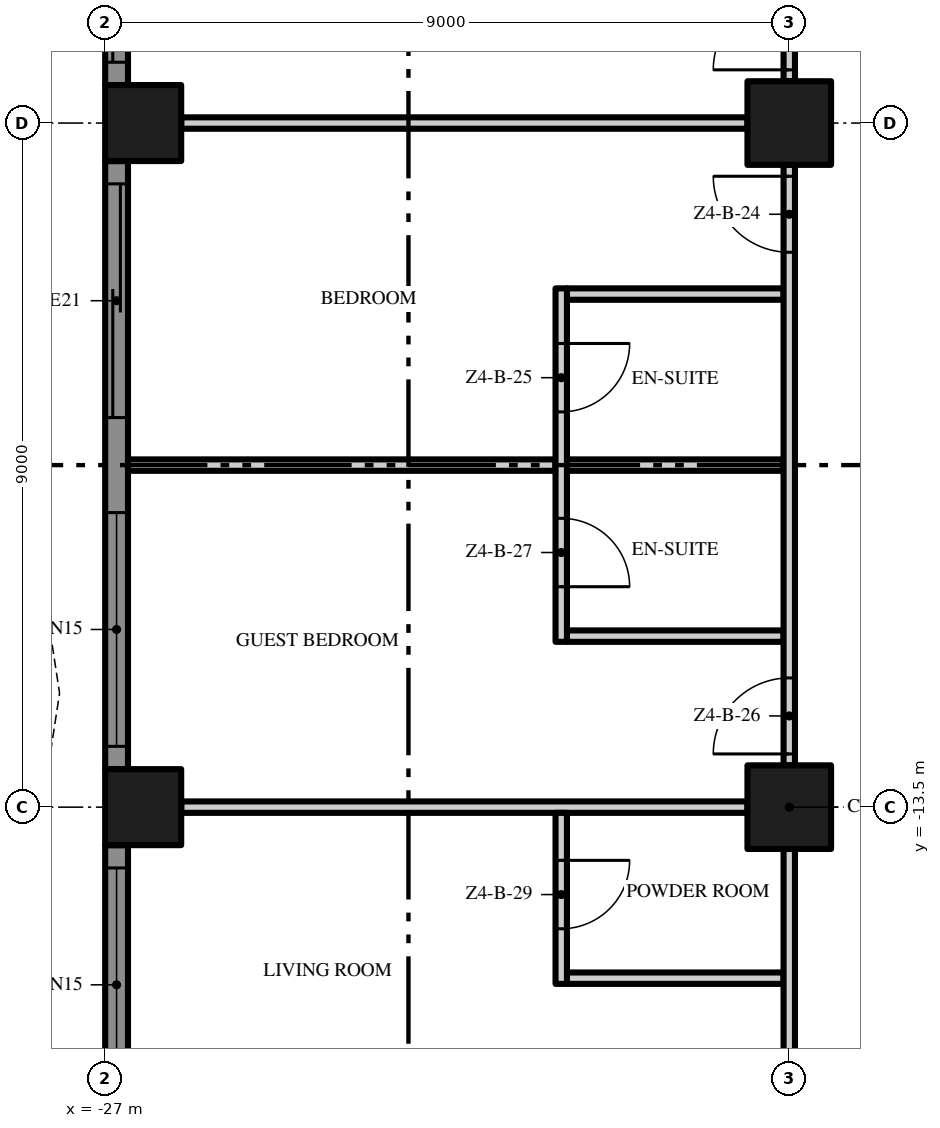
"""IFC4 building model, lengths in metres.
Left out: names, types, materials, properties, quantities, classifications, styles, units other than length and angle.
Written with IfcOpenShell. Run it as: python <this file> out.ifc"""

import sys

from ifc_helpers import new_model, si_unit, direction, frame, frame_2d, origin, origin_2d, place, context, subcontext, project, spatial, polyline, rectangle, outline, extrude, element, fill, save


model = new_model("IFC4")
c1 = context("Model", 3, precision=1e-05, world=origin(), true_north=direction((0.0, 1.0)))
c2 = subcontext(c1, "Body", "Model", "MODEL_VIEW")
j1 = project(units=[si_unit("LENGTHUNIT", "METRE"), si_unit("PLANEANGLEUNIT", "RADIAN")], contexts=[c1])
p1 = place(None, origin())
s1 = spatial("IfcSite", under=j1, at=p1, CompositionType="ELEMENT")
p2 = place(p1, origin())
s2 = spatial("IfcBuilding", under=s1, at=p2, CompositionType="ELEMENT")
p3 = place(p2, frame((0.0, 0.0, 203.4)))
s3 = spatial("IfcBuildingStorey", under=s2, at=p3, CompositionType="ELEMENT", Elevation=203.4)
for number, where, z_axis, x_axis in (
    (1, (-18.0, -13.5, 0.0), (0.0, 0.0, 1.0), (1.0, 0.0, 0.0)),
    (2, (-18.0, -4.5, 0.0), (0.0, 0.0, 1.0), (1.0, 0.0, 0.0)),
):
    element("IfcColumn", number, at=place(p3, frame(where, z_axis=z_axis, x_axis=x_axis)), inside=s3, PredefinedType="COLUMN", context=c2, shape_type="SweptSolid", body=[
        extrude(rectangle(XDim=1.1, YDim=1.1, at=origin_2d()), origin(), (0.0, 0.0, 1.0), 3.5),
    ])
for number, where, z_axis, x_axis in (
    (3, (-26.5, -13.5, 0.0), (0.0, 0.0, 1.0), (1.0, 0.0, 0.0)),
    (4, (-26.5, -4.5, 0.0), (0.0, 0.0, 1.0), (1.0, 0.0, 0.0)),
):
    element("IfcColumn", number, at=place(p3, frame(where, z_axis=z_axis, x_axis=x_axis)), inside=s3, PredefinedType="COLUMN", context=c2, shape_type="SweptSolid", body=[
        extrude(rectangle(XDim=1.0, YDim=1.0, at=origin_2d()), origin(), (0.0, 0.0, 1.0), 3.5),
    ])
p4 = place(p3, frame((-26.85, -4.0, 0.0), z_axis=(0.0, 0.0, 1.0), x_axis=(0.0, 1.0, 0.0)))
e5 = element("IfcWall", 5, at=p4, inside=s3, PredefinedType="SOLIDWALL", context=c2, shape_type="SweptSolid", body=[
    extrude(rectangle(XDim=8.0, YDim=0.3, at=frame_2d((4.0, 0.0))), origin(), (0.0, 0.0, 1.0), 3.5),
])
p5 = place(p4, frame((4.625, 0.0, 0.45)))
e6 = element("IfcOpeningElement", 6, at=p5, cuts=e5, PredefinedType="OPENING", context=c2, shape_type="SweptSolid", body=[
    extrude(rectangle(XDim=3.075, YDim=2.65, at=frame_2d((1.538, 1.325))), frame((0.0, 0.16, 0.0), z_axis=(0.0, -1.0, 0.0), x_axis=(1.0, 0.0, 0.0)), (0.0, 0.0, 1.0), 0.32),
])
p6 = place(p4, frame((0.3, 0.0, 0.0)))
e7 = element("IfcOpeningElement", 7, at=p6, cuts=e5, PredefinedType="OPENING", context=c2, shape_type="SweptSolid", body=[
    extrude(rectangle(XDim=3.075, YDim=2.4, at=frame_2d((1.538, 1.2))), frame((0.0, 0.16, 0.0), z_axis=(0.0, -1.0, 0.0), x_axis=(1.0, 0.0, 0.0)), (0.0, 0.0, 1.0), 0.32),
])
p7 = place(p3, frame((-26.85, -13.0, 0.0), z_axis=(0.0, 0.0, 1.0), x_axis=(0.0, 1.0, 0.0)))
e8 = element("IfcWall", 8, at=p7, inside=s3, PredefinedType="SOLIDWALL", context=c2, shape_type="SweptSolid", body=[
    extrude(rectangle(XDim=8.0, YDim=0.3, at=frame_2d((4.0, 0.0))), origin(), (0.0, 0.0, 1.0), 3.5),
])
p8 = place(p7, frame((4.625, 0.0, 0.0)))
e9 = element("IfcOpeningElement", 9, at=p8, cuts=e8, PredefinedType="OPENING", context=c2, shape_type="SweptSolid", body=[
    extrude(rectangle(XDim=3.075, YDim=2.4, at=frame_2d((1.538, 1.2))), frame((0.0, 0.16, 0.0), z_axis=(0.0, -1.0, 0.0), x_axis=(1.0, 0.0, 0.0)), (0.0, 0.0, 1.0), 0.32),
])
p9 = place(p7, frame((0.3, 0.0, 0.45)))
e10 = element("IfcOpeningElement", 10, at=p9, cuts=e8, PredefinedType="OPENING", context=c2, shape_type="SweptSolid", body=[
    extrude(rectangle(XDim=3.075, YDim=2.65, at=frame_2d((1.538, 1.325))), frame((0.0, 0.16, 0.0), z_axis=(0.0, -1.0, 0.0), x_axis=(1.0, 0.0, 0.0)), (0.0, 0.0, 1.0), 0.32),
])
p10 = place(p3, frame((-26.85, -18.0, 0.0), z_axis=(0.0, 0.0, 1.0), x_axis=(0.0, 1.0, 0.0)))
e11 = element("IfcWall", 11, at=p10, inside=s3, PredefinedType="SOLIDWALL", context=c2, shape_type="SweptSolid", body=[
    extrude(rectangle(XDim=4.0, YDim=0.3, at=frame_2d((2.0, 0.0))), origin(), (0.0, 0.0, 1.0), 3.5),
])
p11 = place(p10, frame((0.625, 0.0, 0.45)))
e12 = element("IfcOpeningElement", 12, at=p11, cuts=e11, PredefinedType="OPENING", context=c2, shape_type="SweptSolid", body=[
    extrude(rectangle(XDim=3.075, YDim=2.65, at=frame_2d((1.538, 1.325))), frame((0.0, 0.16, 0.0), z_axis=(0.0, -1.0, 0.0), x_axis=(1.0, 0.0, 0.0)), (0.0, 0.0, 1.0), 0.32),
])
p12 = place(p3, origin())
e13 = element("IfcWall", 13, at=p12, inside=s3, PredefinedType="USERDEFINED", context=c2, shape_type="SweptSolid", body=[
    extrude(outline(polyline([(-27.6, 18.0), (-27.829, 16.5), (-28.429, 15.0), (-29.171, 13.5), (-29.771, 12.0), (-30.0, 10.5), (-29.771, 9.0), (-29.171, 7.5), (-28.429, 6.0), (-27.829, 4.5), (-27.6, 3.0), (-27.829, 1.5), (-28.429, 0.0), (-29.171, -1.5), (-29.771, -3.0), (-30.0, -4.5), (-29.771, -6.0), (-29.171, -7.5), (-28.429, -9.0), (-27.829, -10.5), (-27.6, -12.0), (-27.829, -13.5), (-28.429, -15.0), (-29.171, -16.5), (-29.771, -18.0), (-29.539, -18.093), (-28.942, -16.602), (-28.201, -15.102), (-27.586, -13.566), (-27.347, -12.0), (-27.586, -10.434), (-28.201, -8.898), (-28.942, -7.398), (-29.528, -5.934), (-29.747, -4.5), (-29.528, -3.066), (-28.942, -1.602), (-28.201, -0.102), (-27.586, 1.434), (-27.347, 3.0), (-27.586, 4.566), (-28.201, 6.102), (-28.942, 7.602), (-29.528, 9.066), (-29.747, 10.5), (-29.528, 11.934), (-28.942, 13.398), (-28.201, 14.898), (-27.586, 16.434), (-27.353, 17.962), (-27.6, 18.0)])), origin(), (0.0, 0.0, 1.0), 0.9),
])
p13 = place(p3, frame((-20.925, -15.75, 0.0), z_axis=(0.0, 0.0, 1.0), x_axis=(1.0, 0.0, 0.0)))
e14 = element("IfcWall", 14, at=p13, inside=s3, PredefinedType="PARTITIONING", context=c2, shape_type="SweptSolid", body=[
    extrude(rectangle(XDim=2.85, YDim=0.15, at=frame_2d((1.425, 0.0))), origin(), (0.0, 0.0, 1.0), 3.5),
])
p14 = place(p3, frame((-26.0, -13.5, 0.0), z_axis=(0.0, 0.0, 1.0), x_axis=(1.0, 0.0, 0.0)))
e15 = element("IfcWall", 15, at=p14, inside=s3, PredefinedType="PARTITIONING", context=c2, shape_type="SweptSolid", body=[
    extrude(rectangle(XDim=7.45, YDim=0.15, at=frame_2d((3.725, 0.0))), origin(), (0.0, 0.0, 1.0), 3.5),
])
p15 = place(p3, frame((-20.925, -11.25, 0.0), z_axis=(0.0, 0.0, 1.0), x_axis=(1.0, 0.0, 0.0)))
e16 = element("IfcWall", 16, at=p15, inside=s3, PredefinedType="PARTITIONING", context=c2, shape_type="SweptSolid", body=[
    extrude(rectangle(XDim=2.85, YDim=0.15, at=frame_2d((1.425, 0.0))), origin(), (0.0, 0.0, 1.0), 3.5),
])
p16 = place(p3, frame((-26.7, -9.0, 0.0), z_axis=(0.0, 0.0, 1.0), x_axis=(1.0, 0.0, 0.0)))
e17 = element("IfcWall", 17, at=p16, inside=s3, PredefinedType="PARTITIONING", context=c2, shape_type="SweptSolid", body=[
    extrude(rectangle(XDim=5.625, YDim=0.15, at=frame_2d((2.812, 0.0))), origin(), (0.0, 0.0, 1.0), 3.5),
])
for number, where, z_axis, x_axis in (
    (18, (-20.925, -9.0, 0.0), (0.0, 0.0, 1.0), (1.0, 0.0, 0.0)),
    (19, (-20.925, -6.75, 0.0), (0.0, 0.0, 1.0), (1.0, 0.0, 0.0)),
):
    element("IfcWall", number, at=place(p3, frame(where, z_axis=z_axis, x_axis=x_axis)), inside=s3, PredefinedType="PARTITIONING", context=c2, shape_type="SweptSolid", body=[
        extrude(rectangle(XDim=2.85, YDim=0.15, at=frame_2d((1.425, 0.0))), origin(), (0.0, 0.0, 1.0), 3.5),
    ])
p17 = place(p3, frame((-26.0, -4.5, 0.0), z_axis=(0.0, 0.0, 1.0), x_axis=(1.0, 0.0, 0.0)))
e20 = element("IfcWall", 20, at=p17, inside=s3, PredefinedType="PARTITIONING", context=c2, shape_type="SweptSolid", body=[
    extrude(rectangle(XDim=7.45, YDim=0.15, at=frame_2d((3.725, 0.0))), origin(), (0.0, 0.0, 1.0), 3.5),
])
p18 = place(p3, frame((-21.0, -13.575, 0.0), z_axis=(0.0, 0.0, 1.0), x_axis=(0.0, -1.0, 0.0)))
e21 = element("IfcWall", 21, at=p18, inside=s3, PredefinedType="PARTITIONING", context=c2, shape_type="SweptSolid", body=[
    extrude(rectangle(XDim=2.25, YDim=0.15, at=frame_2d((1.125, 0.0))), origin(), (0.0, 0.0, 1.0), 3.5),
])
p19 = place(p18, frame((0.625, 0.0, 0.0)))
e22 = element("IfcOpeningElement", 22, at=p19, cuts=e21, PredefinedType="OPENING", context=c2, shape_type="SweptSolid", body=[
    extrude(rectangle(XDim=0.9, YDim=2.1, at=frame_2d((0.45, 1.05))), frame((0.0, 0.085, 0.0), z_axis=(0.0, -1.0, 0.0), x_axis=(1.0, 0.0, 0.0)), (0.0, 0.0, 1.0), 0.17),
])
p20 = place(p3, frame((-21.0, -6.675, 0.0), z_axis=(0.0, 0.0, 1.0), x_axis=(0.0, -1.0, 0.0)))
e23 = element("IfcWall", 23, at=p20, inside=s3, PredefinedType="PARTITIONING", context=c2, shape_type="SweptSolid", body=[
    extrude(rectangle(XDim=4.65, YDim=0.15, at=frame_2d((2.325, 0.0))), origin(), (0.0, 0.0, 1.0), 3.5),
])
p21 = place(p20, frame((0.725, 0.0, 0.0)))
e24 = element("IfcOpeningElement", 24, at=p21, cuts=e23, PredefinedType="OPENING", context=c2, shape_type="SweptSolid", body=[
    extrude(rectangle(XDim=0.9, YDim=2.1, at=frame_2d((0.45, 1.05))), frame((0.0, 0.085, 0.0), z_axis=(0.0, -1.0, 0.0), x_axis=(1.0, 0.0, 0.0)), (0.0, 0.0, 1.0), 0.17),
])
p22 = place(p20, frame((3.025, 0.0, 0.0)))
e25 = element("IfcOpeningElement", 25, at=p22, cuts=e23, PredefinedType="OPENING", context=c2, shape_type="SweptSolid", body=[
    extrude(rectangle(XDim=0.9, YDim=2.1, at=frame_2d((0.45, 1.05))), frame((0.0, 0.085, 0.0), z_axis=(0.0, -1.0, 0.0), x_axis=(1.0, 0.0, 0.0)), (0.0, 0.0, 1.0), 0.17),
])
p23 = place(p3, frame((-18.0, -21.5, 0.0), z_axis=(0.0, 0.0, 1.0), x_axis=(0.0, 1.0, 0.0)))
e26 = element("IfcWall", 26, at=p23, inside=s3, PredefinedType="PARTITIONING", context=c2, shape_type="SweptSolid", body=[
    extrude(rectangle(XDim=7.45, YDim=0.15, at=frame_2d((3.725, 0.0))), origin(), (0.0, 0.0, 1.0), 3.5),
])
p24 = place(p23, frame((1.45, 0.0, 0.0)))
e27 = element("IfcOpeningElement", 27, at=p24, cuts=e26, PredefinedType="OPENING", context=c2, shape_type="SweptSolid", body=[
    extrude(rectangle(XDim=1.8, YDim=2.4, at=frame_2d((0.9, 1.2))), frame((0.0, 0.085, 0.0), z_axis=(0.0, -1.0, 0.0), x_axis=(1.0, 0.0, 0.0)), (0.0, 0.0, 1.0), 0.17),
])
p25 = place(p3, frame((-18.0, -12.95, 0.0), z_axis=(0.0, 0.0, 1.0), x_axis=(0.0, 1.0, 0.0)))
e28 = element("IfcWall", 28, at=p25, inside=s3, PredefinedType="PARTITIONING", context=c2, shape_type="SweptSolid", body=[
    extrude(rectangle(XDim=7.9, YDim=0.15, at=frame_2d((3.95, 0.0))), origin(), (0.0, 0.0, 1.0), 3.5),
])
p26 = place(p25, frame((6.75, 0.0, 0.0)))
e29 = element("IfcOpeningElement", 29, at=p26, cuts=e28, PredefinedType="OPENING", context=c2, shape_type="SweptSolid", body=[
    extrude(rectangle(XDim=1.0, YDim=2.4, at=frame_2d((0.5, 1.2))), frame((0.0, 0.085, 0.0), z_axis=(0.0, -1.0, 0.0), x_axis=(1.0, 0.0, 0.0)), (0.0, 0.0, 1.0), 0.17),
])
p27 = place(p25, frame((0.15, 0.0, 0.0)))
e30 = element("IfcOpeningElement", 30, at=p27, cuts=e28, PredefinedType="OPENING", context=c2, shape_type="SweptSolid", body=[
    extrude(rectangle(XDim=1.0, YDim=2.4, at=frame_2d((0.5, 1.2))), frame((0.0, 0.085, 0.0), z_axis=(0.0, -1.0, 0.0), x_axis=(1.0, 0.0, 0.0)), (0.0, 0.0, 1.0), 0.17),
])
p28 = place(p3, frame((-18.0, -3.95, 0.0), z_axis=(0.0, 0.0, 1.0), x_axis=(0.0, 1.0, 0.0)))
e31 = element("IfcWall", 31, at=p28, inside=s3, PredefinedType="PARTITIONING", context=c2, shape_type="SweptSolid", body=[
    extrude(rectangle(XDim=3.85, YDim=0.15, at=frame_2d((1.925, 0.0))), origin(), (0.0, 0.0, 1.0), 3.5),
])
p29 = place(p28, frame((0.15, 0.0, 0.0)))
e32 = element("IfcOpeningElement", 32, at=p29, cuts=e31, PredefinedType="OPENING", context=c2, shape_type="SweptSolid", body=[
    extrude(rectangle(XDim=1.0, YDim=2.4, at=frame_2d((0.5, 1.2))), frame((0.0, 0.085, 0.0), z_axis=(0.0, -1.0, 0.0), x_axis=(1.0, 0.0, 0.0)), (0.0, 0.0, 1.0), 0.17),
])
p30 = place(p6, origin())
e33 = element("IfcDoor", 33, at=p30, inside=s3, OperationType="SINGLE_SWING_LEFT", PredefinedType="DOOR", context=c2, shape_type="SweptSolid", body=[
    extrude(rectangle(XDim=3.075, YDim=2.4, at=frame_2d((1.538, 1.2))), frame((0.0, 0.025, 0.0), z_axis=(0.0, -1.0, 0.0), x_axis=(1.0, 0.0, 0.0)), (0.0, 0.0, 1.0), 0.05),
])
fill(e7, e33)
p31 = place(p8, origin())
e34 = element("IfcDoor", 34, at=p31, inside=s3, OperationType="SINGLE_SWING_LEFT", PredefinedType="DOOR", context=c2, shape_type="SweptSolid", body=[
    extrude(rectangle(XDim=3.075, YDim=2.4, at=frame_2d((1.538, 1.2))), frame((0.0, 0.025, 0.0), z_axis=(0.0, -1.0, 0.0), x_axis=(1.0, 0.0, 0.0)), (0.0, 0.0, 1.0), 0.05),
])
fill(e9, e34)
p32 = place(p9, origin())
e35 = element("IfcWindow", 35, at=p32, inside=s3, PartitioningType="SINGLE_PANEL", PredefinedType="WINDOW", context=c2, shape_type="SweptSolid", body=[
    extrude(rectangle(XDim=3.075, YDim=2.65, at=frame_2d((1.538, 1.325))), frame((0.0, 0.03, 0.0), z_axis=(0.0, -1.0, 0.0), x_axis=(1.0, 0.0, 0.0)), (0.0, 0.0, 1.0), 0.06),
])
fill(e10, e35)
p33 = place(p11, origin())
e36 = element("IfcWindow", 36, at=p33, inside=s3, PartitioningType="SINGLE_PANEL", PredefinedType="WINDOW", context=c2, shape_type="SweptSolid", body=[
    extrude(rectangle(XDim=3.075, YDim=2.65, at=frame_2d((1.538, 1.325))), frame((0.0, 0.03, 0.0), z_axis=(0.0, -1.0, 0.0), x_axis=(1.0, 0.0, 0.0)), (0.0, 0.0, 1.0), 0.06),
])
fill(e12, e36)
p34 = place(p29, origin())
e37 = element("IfcDoor", 37, at=p34, inside=s3, OperationType="SINGLE_SWING_LEFT", PredefinedType="DOOR", context=c2, shape_type="SweptSolid", body=[
    extrude(rectangle(XDim=1.0, YDim=2.4, at=frame_2d((0.5, 1.2))), frame((0.0, 0.025, 0.0), z_axis=(0.0, -1.0, 0.0), x_axis=(1.0, 0.0, 0.0)), (0.0, 0.0, 1.0), 0.05),
])
fill(e32, e37)
p35 = place(p26, origin())
e38 = element("IfcDoor", 38, at=p35, inside=s3, OperationType="SINGLE_SWING_RIGHT", PredefinedType="DOOR", context=c2, shape_type="SweptSolid", body=[
    extrude(rectangle(XDim=1.0, YDim=2.4, at=frame_2d((0.5, 1.2))), frame((0.0, 0.025, 0.0), z_axis=(0.0, -1.0, 0.0), x_axis=(1.0, 0.0, 0.0)), (0.0, 0.0, 1.0), 0.05),
])
fill(e29, e38)
p36 = place(p21, origin())
e39 = element("IfcDoor", 39, at=p36, inside=s3, OperationType="SINGLE_SWING_LEFT", PredefinedType="DOOR", context=c2, shape_type="SweptSolid", body=[
    extrude(rectangle(XDim=0.9, YDim=2.1, at=frame_2d((0.45, 1.05))), frame((0.0, 0.025, 0.0), z_axis=(0.0, -1.0, 0.0), x_axis=(1.0, 0.0, 0.0)), (0.0, 0.0, 1.0), 0.05),
])
fill(e24, e39)
p37 = place(p27, origin())
e40 = element("IfcDoor", 40, at=p37, inside=s3, OperationType="SINGLE_SWING_LEFT", PredefinedType="DOOR", context=c2, shape_type="SweptSolid", body=[
    extrude(rectangle(XDim=1.0, YDim=2.4, at=frame_2d((0.5, 1.2))), frame((0.0, 0.025, 0.0), z_axis=(0.0, -1.0, 0.0), x_axis=(1.0, 0.0, 0.0)), (0.0, 0.0, 1.0), 0.05),
])
fill(e30, e40)
p38 = place(p22, origin())
e41 = element("IfcDoor", 41, at=p38, inside=s3, OperationType="SINGLE_SWING_RIGHT", PredefinedType="DOOR", context=c2, shape_type="SweptSolid", body=[
    extrude(rectangle(XDim=0.9, YDim=2.1, at=frame_2d((0.45, 1.05))), frame((0.0, 0.025, 0.0), z_axis=(0.0, -1.0, 0.0), x_axis=(1.0, 0.0, 0.0)), (0.0, 0.0, 1.0), 0.05),
])
fill(e25, e41)
p39 = place(p19, origin())
e42 = element("IfcDoor", 42, at=p39, inside=s3, OperationType="SINGLE_SWING_LEFT", PredefinedType="DOOR", context=c2, shape_type="SweptSolid", body=[
    extrude(rectangle(XDim=0.9, YDim=2.1, at=frame_2d((0.45, 1.05))), frame((0.0, 0.025, 0.0), z_axis=(0.0, -1.0, 0.0), x_axis=(1.0, 0.0, 0.0)), (0.0, 0.0, 1.0), 0.05),
])
fill(e22, e42)
save(model, sys.argv[1])
